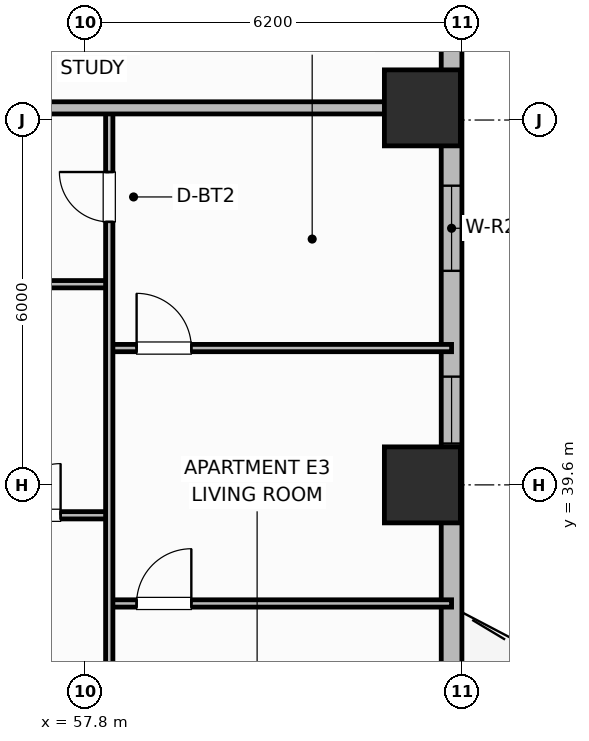
"""IFC4 building model, lengths in metres.
Left out: names, types, materials, properties, quantities, classifications, styles, units other than length and angle.
Written with IfcOpenShell. Run it as: python <this file> out.ifc"""

import sys

from ifc_helpers import new_model, si_unit, direction, frame, frame_2d, origin, origin_2d, place, context, subcontext, project, spatial, rectangle, extrude, element, fill, save


model = new_model("IFC4")
c1 = context("Model", 3, precision=1e-05, world=origin(), true_north=direction((0.0, 1.0)))
c2 = subcontext(c1, "Body", "Model", "MODEL_VIEW")
j1 = project(units=[si_unit("LENGTHUNIT", "METRE"), si_unit("PLANEANGLEUNIT", "RADIAN")], contexts=[c1])
p1 = place(None, origin())
s1 = spatial("IfcSite", under=j1, at=p1, CompositionType="ELEMENT")
p2 = place(p1, origin())
s2 = spatial("IfcBuilding", under=s1, at=p2, CompositionType="ELEMENT")
p3 = place(p2, frame((0.0, 0.0, 73.2)))
s3 = spatial("IfcBuildingStorey", under=s2, at=p3, CompositionType="ELEMENT", Elevation=73.2)
for number, where, z_axis, x_axis in (
    (1, (63.35, 39.6, 0.0), (0.0, 0.0, 1.0), (1.0, 0.0, 0.0)),
    (2, (63.35, 45.8, 0.0), (0.0, 0.0, 1.0), (1.0, 0.0, 0.0)),
):
    element("IfcColumn", number, at=place(p3, frame(where, z_axis=z_axis, x_axis=x_axis)), inside=s3, PredefinedType="COLUMN", context=c2, shape_type="SweptSolid", body=[
        extrude(rectangle(XDim=1.25, YDim=1.25, at=origin_2d()), origin(), (0.0, 0.0, 1.0), 3.7),
    ])
p4 = place(p3, frame((63.83, 32.6, 0.0), z_axis=(0.0, 0.0, 1.0), x_axis=(0.0, 1.0, 0.0)))
e3 = element("IfcWall", 3, at=p4, inside=s3, PredefinedType="SOLIDWALL", context=c2, shape_type="SweptSolid", body=[
    extrude(rectangle(XDim=14.8, YDim=0.34, at=frame_2d((7.4, 0.0))), origin(), (0.0, 0.0, 1.0), 2.66),
])
p5 = place(p4, frame((1.7, 0.0, 0.0)))
e4 = element("IfcOpeningElement", 4, at=p5, cuts=e3, PredefinedType="OPENING", context=c2, shape_type="SweptSolid", body=[
    extrude(rectangle(XDim=1.6, YDim=2.1, at=frame_2d((0.8, 1.05))), frame((0.0, 0.18, 0.0), z_axis=(0.0, -1.0, 0.0), x_axis=(1.0, 0.0, 0.0)), (0.0, 0.0, 1.0), 0.36),
])
p6 = place(p4, frame((7.68, 0.0, 0.85)))
e5 = element("IfcOpeningElement", 5, at=p6, cuts=e3, PredefinedType="OPENING", context=c2, shape_type="SweptSolid", body=[
    extrude(rectangle(XDim=1.1, YDim=1.65, at=frame_2d((0.55, 0.825))), frame((0.0, 0.18, 0.0), z_axis=(0.0, -1.0, 0.0), x_axis=(1.0, 0.0, 0.0)), (0.0, 0.0, 1.0), 0.36),
])
p7 = place(p4, frame((10.52, 0.0, 0.65)))
e6 = element("IfcOpeningElement", 6, at=p7, cuts=e3, PredefinedType="OPENING", context=c2, shape_type="SweptSolid", body=[
    extrude(rectangle(XDim=1.4, YDim=1.85, at=frame_2d((0.7, 0.925))), frame((0.0, 0.18, 0.0), z_axis=(0.0, -1.0, 0.0), x_axis=(1.0, 0.0, 0.0)), (0.0, 0.0, 1.0), 0.36),
])
p8 = place(p3, frame((55.95, 39.1, 0.0), z_axis=(0.0, 0.0, 1.0), x_axis=(1.0, 0.0, 0.0)))
e7 = element("IfcWall", 7, at=p8, inside=s3, PredefinedType="PARTITIONING", context=c2, shape_type="SweptSolid", body=[
    extrude(rectangle(XDim=2.25, YDim=0.12, at=frame_2d((1.125, 0.0))), origin(), (0.0, 0.0, 1.0), 2.49),
])
p9 = place(p8, frame((0.6, 0.0, 0.0)))
e8 = element("IfcOpeningElement", 8, at=p9, cuts=e7, PredefinedType="OPENING", context=c2, shape_type="SweptSolid", body=[
    extrude(rectangle(XDim=0.85, YDim=2.1, at=frame_2d((0.425, 1.05))), frame((0.0, 0.07, 0.0), z_axis=(0.0, -1.0, 0.0), x_axis=(1.0, 0.0, 0.0)), (0.0, 0.0, 1.0), 0.14),
])
p10 = place(p3, frame((55.95, 42.9, 0.0), z_axis=(0.0, 0.0, 1.0), x_axis=(1.0, 0.0, 0.0)))
e9 = element("IfcWall", 9, at=p10, inside=s3, PredefinedType="PARTITIONING", context=c2, shape_type="SweptSolid", body=[
    extrude(rectangle(XDim=2.25, YDim=0.12, at=frame_2d((1.125, 0.0))), origin(), (0.0, 0.0, 1.0), 2.49),
])
p11 = place(p3, frame((58.2, 37.65, 0.0), z_axis=(0.0, 0.0, 1.0), x_axis=(1.0, 0.0, 0.0)))
e10 = element("IfcWall", 10, at=p11, inside=s3, PredefinedType="PARTITIONING", context=c2, shape_type="SweptSolid", body=[
    extrude(rectangle(XDim=5.63, YDim=0.12, at=frame_2d((2.815, 0.0))), origin(), (0.0, 0.0, 1.0), 2.49),
])
p12 = place(p11, frame((0.45, 0.0, 0.0)))
e11 = element("IfcOpeningElement", 11, at=p12, cuts=e10, PredefinedType="OPENING", context=c2, shape_type="SweptSolid", body=[
    extrude(rectangle(XDim=0.9, YDim=2.1, at=frame_2d((0.45, 1.05))), frame((0.0, 0.07, 0.0), z_axis=(0.0, -1.0, 0.0), x_axis=(1.0, 0.0, 0.0)), (0.0, 0.0, 1.0), 0.14),
])
p13 = place(p3, frame((58.2, 41.85, 0.0), z_axis=(0.0, 0.0, 1.0), x_axis=(1.0, 0.0, 0.0)))
e12 = element("IfcWall", 12, at=p13, inside=s3, PredefinedType="PARTITIONING", context=c2, shape_type="SweptSolid", body=[
    extrude(rectangle(XDim=5.63, YDim=0.12, at=frame_2d((2.815, 0.0))), origin(), (0.0, 0.0, 1.0), 2.49),
])
p14 = place(p13, frame((0.45, 0.0, 0.0)))
e13 = element("IfcOpeningElement", 13, at=p14, cuts=e12, PredefinedType="OPENING", context=c2, shape_type="SweptSolid", body=[
    extrude(rectangle(XDim=0.9, YDim=2.1, at=frame_2d((0.45, 1.05))), frame((0.0, 0.07, 0.0), z_axis=(0.0, -1.0, 0.0), x_axis=(1.0, 0.0, 0.0)), (0.0, 0.0, 1.0), 0.14),
])
p15 = place(p3, frame((58.2, 33.74, 0.0), z_axis=(0.0, 0.0, 1.0), x_axis=(0.0, 1.0, 0.0)))
e14 = element("IfcWall", 14, at=p15, inside=s3, PredefinedType="PARTITIONING", context=c2, shape_type="SweptSolid", body=[
    extrude(rectangle(XDim=12.02, YDim=0.12, at=frame_2d((6.01, 0.0))), origin(), (0.0, 0.0, 1.0), 2.49),
])
p16 = place(p15, frame((0.41, 0.0, 0.0)))
e15 = element("IfcOpeningElement", 15, at=p16, cuts=e14, PredefinedType="OPENING", context=c2, shape_type="SweptSolid", body=[
    extrude(rectangle(XDim=0.9, YDim=2.1, at=frame_2d((0.45, 1.05))), frame((0.0, 0.07, 0.0), z_axis=(0.0, -1.0, 0.0), x_axis=(1.0, 0.0, 0.0)), (0.0, 0.0, 1.0), 0.14),
])
p17 = place(p15, frame((10.185, 0.0, 0.0)))
e16 = element("IfcOpeningElement", 16, at=p17, cuts=e14, PredefinedType="OPENING", context=c2, shape_type="SweptSolid", body=[
    extrude(rectangle(XDim=0.82, YDim=2.08, at=frame_2d((0.41, 1.04))), frame((0.0, 0.07, 0.0), z_axis=(0.0, -1.0, 0.0), x_axis=(1.0, 0.0, 0.0)), (0.0, 0.0, 1.0), 0.14),
])
p18 = place(p3, frame((55.95, 45.8, 0.0), z_axis=(0.0, 0.0, 1.0), x_axis=(1.0, 0.0, 0.0)))
e17 = element("IfcWall", 17, at=p18, inside=s3, PredefinedType="PARTITIONING", context=c2, shape_type="SweptSolid", body=[
    extrude(rectangle(XDim=7.46, YDim=0.2, at=frame_2d((3.73, 0.0))), origin(), (0.0, 0.0, 1.0), 2.49),
])
p19 = place(p6, origin())
e18 = element("IfcWindow", 18, at=p19, inside=s3, PartitioningType="SINGLE_PANEL", PredefinedType="WINDOW", context=c2, shape_type="SweptSolid", body=[
    extrude(rectangle(XDim=1.1, YDim=1.65, at=frame_2d((0.55, 0.825))), frame((0.0, 0.03, 0.0), z_axis=(0.0, -1.0, 0.0), x_axis=(1.0, 0.0, 0.0)), (0.0, 0.0, 1.0), 0.06),
])
fill(e5, e18)
p20 = place(p7, origin())
e19 = element("IfcWindow", 19, at=p20, inside=s3, PartitioningType="SINGLE_PANEL", PredefinedType="WINDOW", context=c2, shape_type="SweptSolid", body=[
    extrude(rectangle(XDim=1.4, YDim=1.85, at=frame_2d((0.7, 0.925))), frame((0.0, 0.03, 0.0), z_axis=(0.0, -1.0, 0.0), x_axis=(1.0, 0.0, 0.0)), (0.0, 0.0, 1.0), 0.06),
])
fill(e6, e19)
p21 = place(p9, origin())
e20 = element("IfcDoor", 20, at=p21, inside=s3, OperationType="SINGLE_SWING_RIGHT", PredefinedType="DOOR", context=c2, shape_type="SweptSolid", body=[
    extrude(rectangle(XDim=0.85, YDim=2.1, at=frame_2d((0.425, 1.05))), frame((0.0, 0.025, 0.0), z_axis=(0.0, -1.0, 0.0), x_axis=(1.0, 0.0, 0.0)), (0.0, 0.0, 1.0), 0.05),
])
fill(e8, e20)
p22 = place(p12, origin())
e21 = element("IfcDoor", 21, at=p22, inside=s3, OperationType="SINGLE_SWING_RIGHT", PredefinedType="DOOR", context=c2, shape_type="SweptSolid", body=[
    extrude(rectangle(XDim=0.9, YDim=2.1, at=frame_2d((0.45, 1.05))), frame((0.0, 0.025, 0.0), z_axis=(0.0, -1.0, 0.0), x_axis=(1.0, 0.0, 0.0)), (0.0, 0.0, 1.0), 0.05),
])
fill(e11, e21)
p23 = place(p14, origin())
e22 = element("IfcDoor", 22, at=p23, inside=s3, OperationType="SINGLE_SWING_LEFT", PredefinedType="DOOR", context=c2, shape_type="SweptSolid", body=[
    extrude(rectangle(XDim=0.9, YDim=2.1, at=frame_2d((0.45, 1.05))), frame((0.0, 0.025, 0.0), z_axis=(0.0, -1.0, 0.0), x_axis=(1.0, 0.0, 0.0)), (0.0, 0.0, 1.0), 0.05),
])
fill(e13, e22)
p24 = place(p17, origin())
e23 = element("IfcDoor", 23, at=p24, inside=s3, OperationType="SINGLE_SWING_RIGHT", PredefinedType="DOOR", context=c2, shape_type="SweptSolid", body=[
    extrude(rectangle(XDim=0.82, YDim=2.08, at=frame_2d((0.41, 1.04))), frame((0.0, 0.025, 0.0), z_axis=(0.0, -1.0, 0.0), x_axis=(1.0, 0.0, 0.0)), (0.0, 0.0, 1.0), 0.05),
])
fill(e16, e23)
save(model, sys.argv[1])
